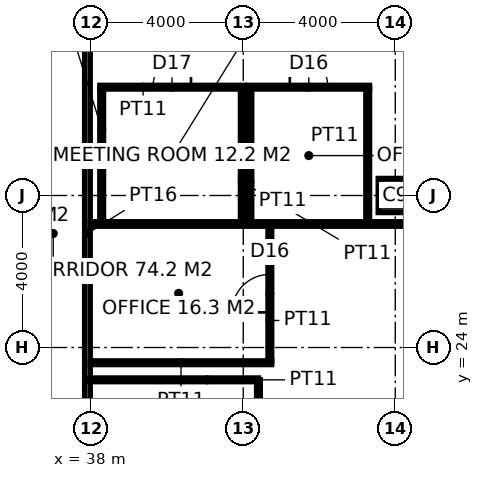
"""IFC4 building model, lengths in metres.
Left out: names, types, materials, properties, quantities, classifications, styles, units other than length and angle.
Written with IfcOpenShell. Run it as: python <this file> out.ifc"""

import sys

from ifc_helpers import new_model, si_unit, direction, frame, frame_2d, origin, origin_2d, place, context, subcontext, project, spatial, rectangle, hollow_rectangle, extrude, element, fill, save


model = new_model("IFC4")
c1 = context("Model", 3, precision=1e-05, world=origin(), true_north=direction((0.0, 1.0)))
c2 = subcontext(c1, "Body", "Model", "MODEL_VIEW")
j1 = project(units=[si_unit("LENGTHUNIT", "METRE"), si_unit("PLANEANGLEUNIT", "RADIAN")], contexts=[c1])
p1 = place(None, origin())
s1 = spatial("IfcSite", under=j1, at=p1, CompositionType="ELEMENT")
p2 = place(p1, origin())
s2 = spatial("IfcBuilding", under=s1, at=p2, CompositionType="ELEMENT")
p3 = place(p2, frame((0.0, 0.0, 101.4)))
s3 = spatial("IfcBuildingStorey", under=s2, at=p3, CompositionType="ELEMENT", Elevation=101.4)
p4 = place(p3, frame((46.0, 28.0, 0.0), z_axis=(0.0, 0.0, 1.0), x_axis=(1.0, 0.0, 0.0)))
e1 = element("IfcColumn", 1, at=p4, inside=s3, PredefinedType="COLUMN", context=c2, shape_type="SweptSolid", body=[
    extrude(hollow_rectangle(XDim=0.9, YDim=0.9, WallThickness=0.125, at=origin_2d()), origin(), (0.0, 0.0, 1.0), 4.0),
])
p5 = place(p3, frame((37.9, 15.625, 0.0), z_axis=(0.0, 0.0, 1.0), x_axis=(0.0, 1.0, 0.0)))
e2 = element("IfcWall", 2, at=p5, inside=s3, PredefinedType="PARTITIONING", context=c2, shape_type="SweptSolid", body=[
    extrude(rectangle(XDim=22.75, YDim=0.15, at=frame_2d((11.375, 0.0))), origin(), (0.0, 0.0, 1.0), 2.65),
])
p6 = place(p5, frame((4.974, 0.0, 0.0)))
e3 = element("IfcOpeningElement", 3, at=p6, cuts=e2, PredefinedType="OPENING", context=c2, shape_type="SweptSolid", body=[
    extrude(rectangle(XDim=1.8, YDim=2.4, at=frame_2d((0.9, 1.2))), frame((0.0, 0.085, 0.0), z_axis=(0.0, -1.0, 0.0), x_axis=(1.0, 0.0, 0.0)), (0.0, 0.0, 1.0), 0.17),
])
p7 = place(p5, frame((16.226, 0.0, 0.0)))
e4 = element("IfcOpeningElement", 4, at=p7, cuts=e2, PredefinedType="OPENING", context=c2, shape_type="SweptSolid", body=[
    extrude(rectangle(XDim=1.8, YDim=2.4, at=frame_2d((0.9, 1.2))), frame((0.0, 0.085, 0.0), z_axis=(0.0, -1.0, 0.0), x_axis=(1.0, 0.0, 0.0)), (0.0, 0.0, 1.0), 0.17),
])
p8 = place(p3, frame((37.975, 27.25, 0.0), z_axis=(0.0, 0.0, 1.0), x_axis=(1.0, 0.0, 0.0)))
e5 = element("IfcWall", 5, at=p8, inside=s3, PredefinedType="PARTITIONING", context=c2, shape_type="SweptSolid", body=[
    extrude(rectangle(XDim=19.725, YDim=0.12, at=frame_2d((9.862, 0.0))), origin(), (0.0, 0.0, 1.0), 3.85),
])
p9 = place(p3, frame((37.975, 23.599, 0.0), z_axis=(0.0, 0.0, 1.0), x_axis=(1.0, 0.0, 0.0)))
e6 = element("IfcWall", 6, at=p9, inside=s3, PredefinedType="PARTITIONING", context=c2, shape_type="SweptSolid", body=[
    extrude(rectangle(XDim=4.775, YDim=0.1, at=frame_2d((2.387, 0.0))), origin(), (0.0, 0.0, 1.0), 2.65),
])
p10 = place(p3, frame((38.225, 30.85, 0.0), z_axis=(0.0, 0.0, 1.0), x_axis=(1.0, 0.0, 0.0)))
e7 = element("IfcWall", 7, at=p10, inside=s3, PredefinedType="PARTITIONING", context=c2, shape_type="SweptSolid", body=[
    extrude(rectangle(XDim=3.8, YDim=0.1, at=frame_2d((1.9, 0.0))), origin(), (0.0, 0.0, 1.0), 3.85),
])
p11 = place(p10, frame((1.4, 0.0, 0.0)))
e8 = element("IfcOpeningElement", 8, at=p11, cuts=e7, PredefinedType="OPENING", context=c2, shape_type="SweptSolid", body=[
    extrude(rectangle(XDim=1.0, YDim=2.2, at=frame_2d((0.5, 1.1))), frame((0.0, 0.06, 0.0), z_axis=(0.0, -1.0, 0.0), x_axis=(1.0, 0.0, 0.0)), (0.0, 0.0, 1.0), 0.12),
])
p12 = place(p3, frame((42.125, 30.85, 0.0), z_axis=(0.0, 0.0, 1.0), x_axis=(1.0, 0.0, 0.0)))
e9 = element("IfcWall", 9, at=p12, inside=s3, PredefinedType="PARTITIONING", context=c2, shape_type="SweptSolid", body=[
    extrude(rectangle(XDim=3.2, YDim=0.1, at=frame_2d((1.6, 0.0))), origin(), (0.0, 0.0, 1.0), 3.85),
])
p13 = place(p12, frame((1.1, 0.0, 0.0)))
e10 = element("IfcOpeningElement", 10, at=p13, cuts=e9, PredefinedType="OPENING", context=c2, shape_type="SweptSolid", body=[
    extrude(rectangle(XDim=1.0, YDim=2.2, at=frame_2d((0.5, 1.1))), frame((0.0, 0.06, 0.0), z_axis=(0.0, -1.0, 0.0), x_axis=(1.0, 0.0, 0.0)), (0.0, 0.0, 1.0), 0.12),
])
for number, where, z_axis, x_axis in (
    (11, (38.275, 27.31, 0.0), (0.0, 0.0, 1.0), (0.0, 1.0, 0.0)),
    (12, (41.975, 27.31, 0.0), (0.0, 0.0, 1.0), (0.0, 1.0, 0.0)),
    (13, (42.175, 27.31, 0.0), (0.0, 0.0, 1.0), (0.0, 1.0, 0.0)),
):
    element("IfcWall", number, at=place(p3, frame(where, z_axis=z_axis, x_axis=x_axis)), inside=s3, PredefinedType="PARTITIONING", context=c2, shape_type="SweptSolid", body=[
        extrude(rectangle(XDim=3.49, YDim=0.1, at=frame_2d((1.745, 0.0))), origin(), (0.0, 0.0, 1.0), 3.85),
    ])
p14 = place(p3, frame((42.7, 23.649, 0.0), z_axis=(0.0, 0.0, 1.0), x_axis=(0.0, 1.0, 0.0)))
e14 = element("IfcWall", 14, at=p14, inside=s3, PredefinedType="PARTITIONING", context=c2, shape_type="SweptSolid", body=[
    extrude(rectangle(XDim=3.54, YDim=0.1, at=frame_2d((1.77, 0.0))), origin(), (0.0, 0.0, 1.0), 3.85),
])
p15 = place(p14, frame((1.275, 0.0, 0.0)))
e15 = element("IfcOpeningElement", 15, at=p15, cuts=e14, PredefinedType="OPENING", context=c2, shape_type="SweptSolid", body=[
    extrude(rectangle(XDim=1.0, YDim=2.2, at=frame_2d((0.5, 1.1))), frame((0.0, 0.06, 0.0), z_axis=(0.0, -1.0, 0.0), x_axis=(1.0, 0.0, 0.0)), (0.0, 0.0, 1.0), 0.12),
])
p16 = place(p3, frame((45.275, 27.31, 0.0), z_axis=(0.0, 0.0, 1.0), x_axis=(0.0, 1.0, 0.0)))
e16 = element("IfcWall", 16, at=p16, inside=s3, PredefinedType="PARTITIONING", context=c2, shape_type="SweptSolid", body=[
    extrude(rectangle(XDim=3.49, YDim=0.1, at=frame_2d((1.745, 0.0))), origin(), (0.0, 0.0, 1.0), 3.85),
])
p17 = place(p3, frame((42.4, 18.049, 0.0), z_axis=(0.0, 0.0, 1.0), x_axis=(0.0, 1.0, 0.0)))
e17 = element("IfcWall", 17, at=p17, inside=s3, PredefinedType="PARTITIONING", context=c2, shape_type="SweptSolid", body=[
    extrude(rectangle(XDim=5.1, YDim=0.1, at=frame_2d((2.55, 0.0))), origin(), (0.0, 0.0, 1.0), 2.65),
])
p18 = place(p17, frame((2.05, 0.0, 0.0)))
e18 = element("IfcOpeningElement", 18, at=p18, cuts=e17, PredefinedType="OPENING", context=c2, shape_type="SweptSolid", body=[
    extrude(rectangle(XDim=1.0, YDim=2.2, at=frame_2d((0.5, 1.1))), frame((0.0, 0.06, 0.0), z_axis=(0.0, -1.0, 0.0), x_axis=(1.0, 0.0, 0.0)), (0.0, 0.0, 1.0), 0.12),
])
p19 = place(p3, frame((42.4, 23.149, 0.0), z_axis=(0.0, 0.0, 1.0), x_axis=(-1.0, 0.0, 0.0)))
e19 = element("IfcWall", 19, at=p19, inside=s3, PredefinedType="PARTITIONING", context=c2, shape_type="SweptSolid", body=[
    extrude(rectangle(XDim=4.5, YDim=0.1, at=frame_2d((2.25, 0.0))), origin(), (0.0, 0.0, 1.0), 3.85),
])
p20 = place(p15, origin())
e20 = element("IfcDoor", 20, at=p20, inside=s3, OperationType="SINGLE_SWING_LEFT", PredefinedType="DOOR", context=c2, shape_type="SweptSolid", body=[
    extrude(rectangle(XDim=1.0, YDim=2.2, at=frame_2d((0.5, 1.1))), frame((0.0, 0.025, 0.0), z_axis=(0.0, -1.0, 0.0), x_axis=(1.0, 0.0, 0.0)), (0.0, 0.0, 1.0), 0.05),
])
fill(e15, e20)
p21 = place(p11, origin())
e21 = element("IfcDoor", 21, at=p21, inside=s3, OperationType="SINGLE_SWING_RIGHT", PredefinedType="DOOR", context=c2, shape_type="SweptSolid", body=[
    extrude(rectangle(XDim=1.0, YDim=2.2, at=frame_2d((0.5, 1.1))), frame((0.0, 0.025, 0.0), z_axis=(0.0, -1.0, 0.0), x_axis=(1.0, 0.0, 0.0)), (0.0, 0.0, 1.0), 0.05),
])
fill(e8, e21)
p22 = place(p13, origin())
e22 = element("IfcDoor", 22, at=p22, inside=s3, OperationType="SINGLE_SWING_LEFT", PredefinedType="DOOR", context=c2, shape_type="SweptSolid", body=[
    extrude(rectangle(XDim=1.0, YDim=2.2, at=frame_2d((0.5, 1.1))), frame((0.0, 0.025, 0.0), z_axis=(0.0, -1.0, 0.0), x_axis=(1.0, 0.0, 0.0)), (0.0, 0.0, 1.0), 0.05),
])
fill(e10, e22)
save(model, sys.argv[1])
